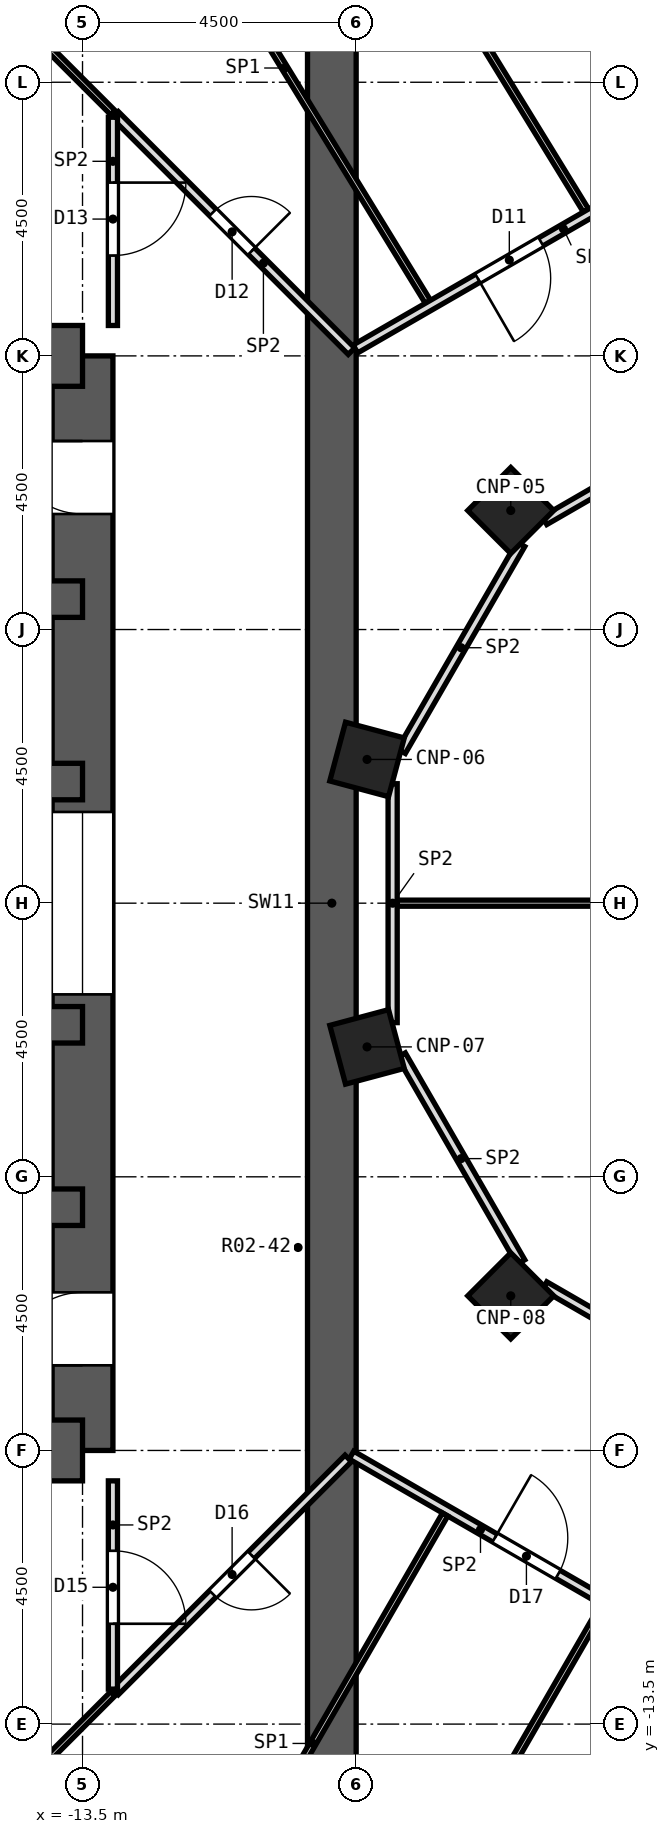
"""IFC4 building model, lengths in metres.
Left out: names, types, materials, properties, quantities, classifications, styles, units other than length and angle.
Written with IfcOpenShell. Run it as: python <this file> out.ifc"""

import sys

from ifc_helpers import new_model, si_unit, direction, frame, frame_2d, origin, origin_2d, place, context, subcontext, project, spatial, rectangle, extrude, element, fill, save


model = new_model("IFC4")
c1 = context("Model", 3, precision=1e-05, world=origin(), true_north=direction((0.0, 1.0)))
c2 = subcontext(c1, "Body", "Model", "MODEL_VIEW")
j1 = project(units=[si_unit("LENGTHUNIT", "METRE"), si_unit("PLANEANGLEUNIT", "RADIAN")], contexts=[c1])
p1 = place(None, origin())
s1 = spatial("IfcSite", under=j1, at=p1, CompositionType="ELEMENT")
p2 = place(p1, origin())
s2 = spatial("IfcBuilding", under=s1, at=p2, CompositionType="ELEMENT")
p3 = place(p2, frame((0.0, 0.0, -4.5)))
s3 = spatial("IfcBuildingStorey", under=s2, at=p3, CompositionType="ELEMENT", Elevation=-4.5)
for number, where, z_axis, x_axis in (
    (1, (-6.458, 6.458, 0.0), (0.0, 0.0, 1.0), (-0.707, 0.707, 0.0)),
    (2, (-8.821, 2.364, 0.0), (0.0, 0.0, 1.0), (-0.966, 0.259, 0.0)),
    (3, (-8.821, -2.364, 0.0), (0.0, 0.0, 1.0), (-0.966, -0.259, 0.0)),
    (4, (-6.458, -6.458, 0.0), (0.0, 0.0, 1.0), (-0.707, -0.707, 0.0)),
):
    element("IfcColumn", number, at=place(p3, frame(where, z_axis=z_axis, x_axis=x_axis)), inside=s3, PredefinedType="COLUMN", context=c2, shape_type="SweptSolid", body=[
        extrude(rectangle(XDim=1.0, YDim=1.0, at=origin_2d()), origin(), (0.0, 0.0, 1.0), 4.5),
    ])
p4 = place(p3, frame((-13.5, -9.0, 0.0), z_axis=(0.0, 0.0, 1.0), x_axis=(0.0, 1.0, 0.0)))
e5 = element("IfcWall", 5, at=p4, inside=s3, PredefinedType="SHEAR", context=c2, shape_type="SweptSolid", body=[
    extrude(rectangle(XDim=18.0, YDim=1.0, at=frame_2d((9.0, 0.0))), origin(), (0.0, 0.0, 1.0), 4.5),
])
p5 = place(p4, frame((15.4, 0.0, 0.0)))
e6 = element("IfcOpeningElement", 6, at=p5, cuts=e5, PredefinedType="OPENING", context=c2, shape_type="SweptSolid", body=[
    extrude(rectangle(XDim=1.2, YDim=2.1, at=frame_2d((0.6, 1.05))), frame((0.0, 0.512, 0.0), z_axis=(0.0, -1.0, 0.0), x_axis=(1.0, 0.0, 0.0)), (0.0, 0.0, 1.0), 1.024),
])
p6 = place(p4, frame((1.4, 0.0, 0.0)))
e7 = element("IfcOpeningElement", 7, at=p6, cuts=e5, PredefinedType="OPENING", context=c2, shape_type="SweptSolid", body=[
    extrude(rectangle(XDim=1.2, YDim=2.1, at=frame_2d((0.6, 1.05))), frame((0.0, 0.512, 0.0), z_axis=(0.0, -1.0, 0.0), x_axis=(1.0, 0.0, 0.0)), (0.0, 0.0, 1.0), 1.024),
])
p7 = place(p4, frame((7.5, 0.0, 0.0)))
e8 = element("IfcOpeningElement", 8, at=p7, cuts=e5, PredefinedType="OPENING", context=c2, shape_type="SweptSolid", body=[
    extrude(rectangle(XDim=3.0, YDim=2.4, at=frame_2d((1.5, 1.2))), frame((0.0, 0.512, 0.0), z_axis=(0.0, -1.0, 0.0), x_axis=(1.0, 0.0, 0.0)), (0.0, 0.0, 1.0), 1.024),
])
for number, where, z_axis, x_axis in (
    (9, (-13.5, 9.0, 0.0), (0.0, 0.0, 1.0), (-1.0, 0.0, 0.0)),
    (10, (-13.5, -9.0, 0.0), (0.0, 0.0, 1.0), (-1.0, 0.0, 0.0)),
):
    element("IfcWall", number, at=place(p3, frame(where, z_axis=z_axis, x_axis=x_axis)), inside=s3, PredefinedType="SHEAR", context=c2, shape_type="SweptSolid", body=[
        extrude(rectangle(XDim=12.4, YDim=1.0, at=frame_2d((6.2, 0.0))), origin(), (0.0, 0.0, 1.0), 4.5),
    ])
p8 = place(p3, frame((-13.5, 5.0, 0.0), z_axis=(0.0, 0.0, 1.0), x_axis=(-1.0, 0.0, 0.0)))
e11 = element("IfcWall", 11, at=p8, inside=s3, PredefinedType="SHEAR", context=c2, shape_type="SweptSolid", body=[
    extrude(rectangle(XDim=12.4, YDim=0.6, at=frame_2d((6.2, 0.0))), origin(), (0.0, 0.0, 1.0), 4.5),
])
p9 = place(p8, frame((10.31, 0.0, 0.0)))
e12 = element("IfcOpeningElement", 12, at=p9, cuts=e11, PredefinedType="OPENING", context=c2, shape_type="SweptSolid", body=[
    extrude(rectangle(XDim=0.9, YDim=2.1, at=frame_2d((0.45, 1.05))), frame((0.0, 0.312, 0.0), z_axis=(0.0, -1.0, 0.0), x_axis=(1.0, 0.0, 0.0)), (0.0, 0.0, 1.0), 0.624),
])
p10 = place(p3, frame((-13.5, -5.0, 0.0), z_axis=(0.0, 0.0, 1.0), x_axis=(-1.0, 0.0, 0.0)))
e13 = element("IfcWall", 13, at=p10, inside=s3, PredefinedType="SHEAR", context=c2, shape_type="SweptSolid", body=[
    extrude(rectangle(XDim=12.4, YDim=0.6, at=frame_2d((6.2, 0.0))), origin(), (0.0, 0.0, 1.0), 4.5),
])
p11 = place(p10, frame((10.716, 0.0, 0.0)))
e14 = element("IfcOpeningElement", 14, at=p11, cuts=e13, PredefinedType="OPENING", context=c2, shape_type="SweptSolid", body=[
    extrude(rectangle(XDim=0.9, YDim=2.1, at=frame_2d((0.45, 1.05))), frame((0.0, 0.312, 0.0), z_axis=(0.0, -1.0, 0.0), x_axis=(1.0, 0.0, 0.0)), (0.0, 0.0, 1.0), 0.624),
])
p12 = place(p10, frame((0.6, 0.0, 0.0)))
e15 = element("IfcOpeningElement", 15, at=p12, cuts=e13, PredefinedType="OPENING", context=c2, shape_type="SweptSolid", body=[
    extrude(rectangle(XDim=1.1, YDim=2.1, at=frame_2d((0.55, 1.05))), frame((0.0, 0.312, 0.0), z_axis=(0.0, -1.0, 0.0), x_axis=(1.0, 0.0, 0.0)), (0.0, 0.0, 1.0), 0.624),
])
p13 = place(p3, frame((-13.5, 2.0, 0.0), z_axis=(0.0, 0.0, 1.0), x_axis=(-1.0, 0.0, 0.0)))
e16 = element("IfcWall", 16, at=p13, inside=s3, PredefinedType="SHEAR", context=c2, shape_type="SweptSolid", body=[
    extrude(rectangle(XDim=12.4, YDim=0.6, at=frame_2d((6.2, 0.0))), origin(), (0.0, 0.0, 1.0), 4.5),
])
p14 = place(p13, frame((1.076, 0.0, 0.0)))
e17 = element("IfcOpeningElement", 17, at=p14, cuts=e16, PredefinedType="OPENING", context=c2, shape_type="SweptSolid", body=[
    extrude(rectangle(XDim=0.9, YDim=2.1, at=frame_2d((0.45, 1.05))), frame((0.0, 0.312, 0.0), z_axis=(0.0, -1.0, 0.0), x_axis=(1.0, 0.0, 0.0)), (0.0, 0.0, 1.0), 0.624),
])
p15 = place(p13, frame((3.196, 0.0, 0.0)))
e18 = element("IfcOpeningElement", 18, at=p15, cuts=e16, PredefinedType="OPENING", context=c2, shape_type="SweptSolid", body=[
    extrude(rectangle(XDim=0.9, YDim=2.1, at=frame_2d((0.45, 1.05))), frame((0.0, 0.312, 0.0), z_axis=(0.0, -1.0, 0.0), x_axis=(1.0, 0.0, 0.0)), (0.0, 0.0, 1.0), 0.624),
])
p16 = place(p13, frame((5.59, 0.0, 0.0)))
e19 = element("IfcOpeningElement", 19, at=p16, cuts=e16, PredefinedType="OPENING", context=c2, shape_type="SweptSolid", body=[
    extrude(rectangle(XDim=0.9, YDim=2.1, at=frame_2d((0.45, 1.05))), frame((0.0, 0.312, 0.0), z_axis=(0.0, -1.0, 0.0), x_axis=(1.0, 0.0, 0.0)), (0.0, 0.0, 1.0), 0.624),
])
p17 = place(p13, frame((10.31, 0.0, 0.0)))
e20 = element("IfcOpeningElement", 20, at=p17, cuts=e16, PredefinedType="OPENING", context=c2, shape_type="SweptSolid", body=[
    extrude(rectangle(XDim=0.9, YDim=2.1, at=frame_2d((0.45, 1.05))), frame((0.0, 0.312, 0.0), z_axis=(0.0, -1.0, 0.0), x_axis=(1.0, 0.0, 0.0)), (0.0, 0.0, 1.0), 0.624),
])
p18 = place(p3, frame((-13.5, -2.0, 0.0), z_axis=(0.0, 0.0, 1.0), x_axis=(-1.0, 0.0, 0.0)))
e21 = element("IfcWall", 21, at=p18, inside=s3, PredefinedType="SHEAR", context=c2, shape_type="SweptSolid", body=[
    extrude(rectangle(XDim=12.4, YDim=0.6, at=frame_2d((6.2, 0.0))), origin(), (0.0, 0.0, 1.0), 4.5),
])
p19 = place(p18, frame((1.265, 0.0, 0.0)))
e22 = element("IfcOpeningElement", 22, at=p19, cuts=e21, PredefinedType="OPENING", context=c2, shape_type="SweptSolid", body=[
    extrude(rectangle(XDim=1.0, YDim=2.1, at=frame_2d((0.5, 1.05))), frame((0.0, 0.312, 0.0), z_axis=(0.0, -1.0, 0.0), x_axis=(1.0, 0.0, 0.0)), (0.0, 0.0, 1.0), 0.624),
])
p20 = place(p18, frame((10.31, 0.0, 0.0)))
e23 = element("IfcOpeningElement", 23, at=p20, cuts=e21, PredefinedType="OPENING", context=c2, shape_type="SweptSolid", body=[
    extrude(rectangle(XDim=0.9, YDim=2.1, at=frame_2d((0.45, 1.05))), frame((0.0, 0.312, 0.0), z_axis=(0.0, -1.0, 0.0), x_axis=(1.0, 0.0, 0.0)), (0.0, 0.0, 1.0), 0.624),
])
p21 = place(p3, frame((-9.4, -27.077, 0.0), z_axis=(0.0, 0.0, 1.0), x_axis=(0.0, 1.0, 0.0)))
e24 = element("IfcWall", 24, at=p21, inside=s3, PredefinedType="SHEAR", context=c2, shape_type="SweptSolid", body=[
    extrude(rectangle(XDim=54.154, YDim=0.8, at=frame_2d((27.077, 0.0))), origin(), (0.0, 0.0, 1.0), 4.5),
])
p22 = place(p3, frame((-7.128, 26.602, 0.0), z_axis=(0.0, 0.0, 1.0), x_axis=(0.258778692841, -0.965936637742, 0.0)))
e25 = element("IfcWall", 25, at=p22, inside=s3, PredefinedType="PARTITIONING", context=c2, shape_type="SweptSolid", body=[
    extrude(rectangle(XDim=14.702, YDim=0.1, at=frame_2d((7.351, 0.0))), origin(), (0.0, 0.0, 1.0), 3.95),
])
p23 = place(p3, frame((-8.257, -2.499, 0.0), z_axis=(0.0, 0.0, 1.0), x_axis=(0.500061252887, -0.865990036525, 0.0)))
e26 = element("IfcWall", 26, at=p23, inside=s3, PredefinedType="PARTITIONING", context=c2, shape_type="SweptSolid", body=[
    extrude(rectangle(XDim=3.93, YDim=0.15, at=frame_2d((1.965, 0.0))), origin(), (0.0, 0.0, 1.0), 3.95),
])
p24 = place(p3, frame((-12.531, 17.578, 0.0), z_axis=(0.0, 0.0, 1.0), x_axis=(0.522457288025, -0.852665457368, 0.0)))
e27 = element("IfcWall", 27, at=p24, inside=s3, PredefinedType="PARTITIONING", context=c2, shape_type="SweptSolid", body=[
    extrude(rectangle(XDim=9.016, YDim=0.1, at=frame_2d((4.508, 0.0))), origin(), (0.0, 0.0, 1.0), 3.95),
])
p25 = place(p3, frame((-9.949, 19.105, 0.0), z_axis=(0.0, 0.0, 1.0), x_axis=(0.522544340664, -0.852612111127, 0.0)))
e28 = element("IfcWall", 28, at=p25, inside=s3, PredefinedType="PARTITIONING", context=c2, shape_type="SweptSolid", body=[
    extrude(rectangle(XDim=9.048, YDim=0.1, at=frame_2d((4.524, 0.0))), origin(), (0.0, 0.0, 1.0), 3.95),
])
p26 = place(p3, frame((-19.474, 19.474, 0.0), z_axis=(0.0, 0.0, 1.0), x_axis=(0.707106781187, -0.707106781187, 0.0)))
e29 = element("IfcWall", 29, at=p26, inside=s3, PredefinedType="PARTITIONING", context=c2, shape_type="SweptSolid", body=[
    extrude(rectangle(XDim=9.155, YDim=0.1, at=frame_2d((4.578, 0.0))), origin(), (0.0, 0.0, 1.0), 3.95),
])
p27 = place(p3, frame((-12.965, 12.965, 0.0), z_axis=(0.0, 0.0, 1.0), x_axis=(0.707106781187, -0.707106781187, 0.0)))
e30 = element("IfcWall", 30, at=p27, inside=s3, PredefinedType="PARTITIONING", context=c2, shape_type="SweptSolid", body=[
    extrude(rectangle(XDim=5.498, YDim=0.15, at=frame_2d((2.749, 0.0))), origin(), (0.0, 0.0, 1.0), 3.95),
])
p28 = place(p27, frame((2.272, 0.0, 0.0)))
e31 = element("IfcOpeningElement", 31, at=p28, cuts=e30, PredefinedType="OPENING", context=c2, shape_type="SweptSolid", body=[
    extrude(rectangle(XDim=0.9, YDim=2.1, at=frame_2d((0.45, 1.05))), frame((0.0, 0.087, 0.0), z_axis=(0.0, -1.0, 0.0), x_axis=(1.0, 0.0, 0.0)), (0.0, 0.0, 1.0), 0.174),
])
p29 = place(p3, frame((-9.077, -9.077, 0.0), z_axis=(0.0, 0.0, 1.0), x_axis=(0.865961614908, -0.500110469302, 0.0)))
e32 = element("IfcWall", 32, at=p29, inside=s3, PredefinedType="PARTITIONING", context=c2, shape_type="SweptSolid", body=[
    extrude(rectangle(XDim=6.645, YDim=0.15, at=frame_2d((3.322, 0.0))), origin(), (0.0, 0.0, 1.0), 3.95),
])
p30 = place(p29, frame((2.722, 0.0, 0.0)))
e33 = element("IfcOpeningElement", 33, at=p30, cuts=e32, PredefinedType="OPENING", context=c2, shape_type="SweptSolid", body=[
    extrude(rectangle(XDim=1.2, YDim=2.1, at=frame_2d((0.6, 1.05))), frame((0.0, 0.087, 0.0), z_axis=(0.0, -1.0, 0.0), x_axis=(1.0, 0.0, 0.0)), (0.0, 0.0, 1.0), 0.174),
])
p31 = place(p29, frame((5.284, 0.0, 0.0)))
e34 = element("IfcOpeningElement", 34, at=p31, cuts=e32, PredefinedType="OPENING", context=c2, shape_type="SweptSolid", body=[
    extrude(rectangle(XDim=0.9, YDim=2.1, at=frame_2d((0.45, 1.05))), frame((0.0, 0.087, 0.0), z_axis=(0.0, -1.0, 0.0), x_axis=(1.0, 0.0, 0.0)), (0.0, 0.0, 1.0), 0.174),
])
p32 = place(p3, frame((-5.902, -6.292, 0.0), z_axis=(0.0, 0.0, 1.0), x_axis=(0.865990036525, -0.500061252887, 0.0)))
e35 = element("IfcWall", 35, at=p32, inside=s3, PredefinedType="PARTITIONING", context=c2, shape_type="SweptSolid", body=[
    extrude(rectangle(XDim=3.93, YDim=0.15, at=frame_2d((1.965, 0.0))), origin(), (0.0, 0.0, 1.0), 3.95),
])
p33 = place(p3, frame((-8.325, 0.0, 0.0), z_axis=(0.0, 0.0, 1.0), x_axis=(1.0, 0.0, 0.0)))
e36 = element("IfcWall", 36, at=p33, inside=s3, PredefinedType="PARTITIONING", context=c2, shape_type="SweptSolid", body=[
    extrude(rectangle(XDim=16.65, YDim=0.1, at=frame_2d((8.325, 0.0))), origin(), (0.0, 0.0, 1.0), 3.95),
])
p34 = place(p3, frame((-5.902, 6.292, 0.0), z_axis=(0.0, 0.0, 1.0), x_axis=(0.865990036525, 0.500061252887, 0.0)))
e37 = element("IfcWall", 37, at=p34, inside=s3, PredefinedType="PARTITIONING", context=c2, shape_type="SweptSolid", body=[
    extrude(rectangle(XDim=3.93, YDim=0.15, at=frame_2d((1.965, 0.0))), origin(), (0.0, 0.0, 1.0), 3.95),
])
p35 = place(p3, frame((-9.012, 9.115, 0.0), z_axis=(0.0, 0.0, 1.0), x_axis=(0.865967095912, 0.5001009786, 0.0)))
e38 = element("IfcWall", 38, at=p35, inside=s3, PredefinedType="PARTITIONING", context=c2, shape_type="SweptSolid", body=[
    extrude(rectangle(XDim=6.495, YDim=0.15, at=frame_2d((3.248, 0.0))), origin(), (0.0, 0.0, 1.0), 3.95),
])
p36 = place(p35, frame((5.046, 0.0, 0.0)))
e39 = element("IfcOpeningElement", 39, at=p36, cuts=e38, PredefinedType="OPENING", context=c2, shape_type="SweptSolid", body=[
    extrude(rectangle(XDim=0.9, YDim=2.1, at=frame_2d((0.45, 1.05))), frame((0.0, 0.087, 0.0), z_axis=(0.0, -1.0, 0.0), x_axis=(1.0, 0.0, 0.0)), (0.0, 0.0, 1.0), 0.174),
])
p37 = place(p35, frame((2.323, 0.0, 0.0)))
e40 = element("IfcOpeningElement", 40, at=p37, cuts=e38, PredefinedType="OPENING", context=c2, shape_type="SweptSolid", body=[
    extrude(rectangle(XDim=1.2, YDim=2.1, at=frame_2d((0.6, 1.05))), frame((0.0, 0.087, 0.0), z_axis=(0.0, -1.0, 0.0), x_axis=(1.0, 0.0, 0.0)), (0.0, 0.0, 1.0), 0.174),
])
p38 = place(p3, frame((-19.474, -19.474, 0.0), z_axis=(0.0, 0.0, 1.0), x_axis=(0.707106781187, 0.707106781187, 0.0)))
e41 = element("IfcWall", 41, at=p38, inside=s3, PredefinedType="PARTITIONING", context=c2, shape_type="SweptSolid", body=[
    extrude(rectangle(XDim=9.155, YDim=0.1, at=frame_2d((4.578, 0.0))), origin(), (0.0, 0.0, 1.0), 3.95),
])
p39 = place(p3, frame((-12.965, -12.965, 0.0), z_axis=(0.0, 0.0, 1.0), x_axis=(0.707106781187, 0.707106781187, 0.0)))
e42 = element("IfcWall", 42, at=p39, inside=s3, PredefinedType="PARTITIONING", context=c2, shape_type="SweptSolid", body=[
    extrude(rectangle(XDim=5.423, YDim=0.15, at=frame_2d((2.711, 0.0))), origin(), (0.0, 0.0, 1.0), 3.95),
])
p40 = place(p39, frame((2.272, 0.0, 0.0)))
e43 = element("IfcOpeningElement", 43, at=p40, cuts=e42, PredefinedType="OPENING", context=c2, shape_type="SweptSolid", body=[
    extrude(rectangle(XDim=0.9, YDim=2.1, at=frame_2d((0.45, 1.05))), frame((0.0, 0.087, 0.0), z_axis=(0.0, -1.0, 0.0), x_axis=(1.0, 0.0, 0.0)), (0.0, 0.0, 1.0), 0.174),
])
p41 = place(p3, frame((-9.286, -19.084, 0.0), z_axis=(0.0, 0.0, 1.0), x_axis=(0.500007644514, 0.866020990177, 0.0)))
e44 = element("IfcWall", 44, at=p41, inside=s3, PredefinedType="PARTITIONING", context=c2, shape_type="SweptSolid", body=[
    extrude(rectangle(XDim=8.695, YDim=0.1, at=frame_2d((4.347, 0.0))), origin(), (0.0, 0.0, 1.0), 3.95),
])
p42 = place(p3, frame((-11.884, -17.584, 0.0), z_axis=(0.0, 0.0, 1.0), x_axis=(0.499971170311, 0.866042047973, 0.0)))
e45 = element("IfcWall", 45, at=p42, inside=s3, PredefinedType="PARTITIONING", context=c2, shape_type="SweptSolid", body=[
    extrude(rectangle(XDim=8.695, YDim=0.1, at=frame_2d((4.348, 0.0))), origin(), (0.0, 0.0, 1.0), 3.95),
])
p43 = place(p3, frame((-8.257, 2.499, 0.0), z_axis=(0.0, 0.0, 1.0), x_axis=(0.500061252887, 0.865990036525, 0.0)))
e46 = element("IfcWall", 46, at=p43, inside=s3, PredefinedType="PARTITIONING", context=c2, shape_type="SweptSolid", body=[
    extrude(rectangle(XDim=3.93, YDim=0.15, at=frame_2d((1.965, 0.0))), origin(), (0.0, 0.0, 1.0), 3.95),
])
p44 = place(p3, frame((-7.128, -26.602, 0.0), z_axis=(0.0, 0.0, 1.0), x_axis=(0.258838422564, 0.965920633906, 0.0)))
e47 = element("IfcWall", 47, at=p44, inside=s3, PredefinedType="PARTITIONING", context=c2, shape_type="SweptSolid", body=[
    extrude(rectangle(XDim=14.627, YDim=0.1, at=frame_2d((7.314, 0.0))), origin(), (0.0, 0.0, 1.0), 3.95),
])
p45 = place(p3, frame((-8.4, -1.964, 0.0), z_axis=(0.0, 0.0, 1.0), x_axis=(0.0, 1.0, 0.0)))
e48 = element("IfcWall", 48, at=p45, inside=s3, PredefinedType="PARTITIONING", context=c2, shape_type="SweptSolid", body=[
    extrude(rectangle(XDim=3.929, YDim=0.15, at=frame_2d((1.964, 0.0))), origin(), (0.0, 0.0, 1.0), 3.95),
])
p46 = place(p3, frame((-13.0, -12.925, 0.0), z_axis=(0.0, 0.0, 1.0), x_axis=(0.0, 1.0, 0.0)))
e49 = element("IfcWall", 49, at=p46, inside=s3, PredefinedType="PARTITIONING", context=c2, shape_type="SweptSolid", body=[
    extrude(rectangle(XDim=3.425, YDim=0.15, at=frame_2d((1.712, 0.0))), origin(), (0.0, 0.0, 1.0), 3.95),
])
p47 = place(p46, frame((1.075, 0.0, 0.0)))
e50 = element("IfcOpeningElement", 50, at=p47, cuts=e49, PredefinedType="OPENING", context=c2, shape_type="SweptSolid", body=[
    extrude(rectangle(XDim=1.2, YDim=2.1, at=frame_2d((0.6, 1.05))), frame((0.0, 0.087, 0.0), z_axis=(0.0, -1.0, 0.0), x_axis=(1.0, 0.0, 0.0)), (0.0, 0.0, 1.0), 0.174),
])
p48 = place(p3, frame((-13.0, 9.5, 0.0), z_axis=(0.0, 0.0, 1.0), x_axis=(0.0, 1.0, 0.0)))
e51 = element("IfcWall", 51, at=p48, inside=s3, PredefinedType="PARTITIONING", context=c2, shape_type="SweptSolid", body=[
    extrude(rectangle(XDim=3.425, YDim=0.15, at=frame_2d((1.712, 0.0))), origin(), (0.0, 0.0, 1.0), 3.95),
])
p49 = place(p48, frame((1.15, 0.0, 0.0)))
e52 = element("IfcOpeningElement", 52, at=p49, cuts=e51, PredefinedType="OPENING", context=c2, shape_type="SweptSolid", body=[
    extrude(rectangle(XDim=1.2, YDim=2.1, at=frame_2d((0.6, 1.05))), frame((0.0, 0.087, 0.0), z_axis=(0.0, -1.0, 0.0), x_axis=(1.0, 0.0, 0.0)), (0.0, 0.0, 1.0), 0.174),
])
p50 = place(p37, frame((1.2, 0.0, 0.0), z_axis=(0.0, 0.0, 1.0), x_axis=(-1.0, 0.0, 0.0)))
e53 = element("IfcDoor", 53, at=p50, inside=s3, OperationType="SINGLE_SWING_RIGHT", PredefinedType="DOOR", context=c2, shape_type="SweptSolid", body=[
    extrude(rectangle(XDim=1.2, YDim=2.1, at=frame_2d((0.6, 1.05))), frame((0.0, 0.025, 0.0), z_axis=(0.0, -1.0, 0.0), x_axis=(1.0, 0.0, 0.0)), (0.0, 0.0, 1.0), 0.05),
])
fill(e40, e53)
p51 = place(p28, origin())
e54 = element("IfcDoor", 54, at=p51, inside=s3, OperationType="SINGLE_SWING_RIGHT", PredefinedType="DOOR", context=c2, shape_type="SweptSolid", body=[
    extrude(rectangle(XDim=0.9, YDim=2.1, at=frame_2d((0.45, 1.05))), frame((0.0, 0.025, 0.0), z_axis=(0.0, -1.0, 0.0), x_axis=(1.0, 0.0, 0.0)), (0.0, 0.0, 1.0), 0.05),
])
fill(e31, e54)
p52 = place(p49, frame((1.2, 0.0, 0.0), z_axis=(0.0, 0.0, 1.0), x_axis=(-1.0, 0.0, 0.0)))
e55 = element("IfcDoor", 55, at=p52, inside=s3, OperationType="SINGLE_SWING_LEFT", PredefinedType="DOOR", context=c2, shape_type="SweptSolid", body=[
    extrude(rectangle(XDim=1.2, YDim=2.1, at=frame_2d((0.6, 1.05))), frame((0.0, 0.025, 0.0), z_axis=(0.0, -1.0, 0.0), x_axis=(1.0, 0.0, 0.0)), (0.0, 0.0, 1.0), 0.05),
])
fill(e52, e55)
p53 = place(p47, frame((1.2, 0.0, 0.0), z_axis=(0.0, 0.0, 1.0), x_axis=(-1.0, 0.0, 0.0)))
e56 = element("IfcDoor", 56, at=p53, inside=s3, OperationType="SINGLE_SWING_RIGHT", PredefinedType="DOOR", context=c2, shape_type="SweptSolid", body=[
    extrude(rectangle(XDim=1.2, YDim=2.1, at=frame_2d((0.6, 1.05))), frame((0.0, 0.025, 0.0), z_axis=(0.0, -1.0, 0.0), x_axis=(1.0, 0.0, 0.0)), (0.0, 0.0, 1.0), 0.05),
])
fill(e50, e56)
p54 = place(p40, frame((0.9, 0.0, 0.0), z_axis=(0.0, 0.0, 1.0), x_axis=(-1.0, 0.0, 0.0)))
e57 = element("IfcDoor", 57, at=p54, inside=s3, OperationType="SINGLE_SWING_LEFT", PredefinedType="DOOR", context=c2, shape_type="SweptSolid", body=[
    extrude(rectangle(XDim=0.9, YDim=2.1, at=frame_2d((0.45, 1.05))), frame((0.0, 0.025, 0.0), z_axis=(0.0, -1.0, 0.0), x_axis=(1.0, 0.0, 0.0)), (0.0, 0.0, 1.0), 0.05),
])
fill(e43, e57)
p55 = place(p30, origin())
e58 = element("IfcDoor", 58, at=p55, inside=s3, OperationType="SINGLE_SWING_LEFT", PredefinedType="DOOR", context=c2, shape_type="SweptSolid", body=[
    extrude(rectangle(XDim=1.2, YDim=2.1, at=frame_2d((0.6, 1.05))), frame((0.0, 0.025, 0.0), z_axis=(0.0, -1.0, 0.0), x_axis=(1.0, 0.0, 0.0)), (0.0, 0.0, 1.0), 0.05),
])
fill(e33, e58)
p56 = place(p5, origin())
e59 = element("IfcDoor", 59, at=p56, inside=s3, OperationType="SINGLE_SWING_RIGHT", PredefinedType="DOOR", context=c2, shape_type="SweptSolid", body=[
    extrude(rectangle(XDim=1.2, YDim=2.1, at=frame_2d((0.6, 1.05))), frame((0.0, 0.025, 0.0), z_axis=(0.0, -1.0, 0.0), x_axis=(1.0, 0.0, 0.0)), (0.0, 0.0, 1.0), 0.05),
])
fill(e6, e59)
p57 = place(p6, origin())
e60 = element("IfcDoor", 60, at=p57, inside=s3, OperationType="SINGLE_SWING_LEFT", PredefinedType="DOOR", context=c2, shape_type="SweptSolid", body=[
    extrude(rectangle(XDim=1.2, YDim=2.1, at=frame_2d((0.6, 1.05))), frame((0.0, 0.025, 0.0), z_axis=(0.0, -1.0, 0.0), x_axis=(1.0, 0.0, 0.0)), (0.0, 0.0, 1.0), 0.05),
])
fill(e7, e60)
p58 = place(p7, origin())
e61 = element("IfcDoor", 61, at=p58, inside=s3, OperationType="DOUBLE_DOOR_SLIDING", PredefinedType="DOOR", context=c2, shape_type="SweptSolid", body=[
    extrude(rectangle(XDim=3.0, YDim=2.4, at=frame_2d((1.5, 1.2))), frame((0.0, 0.025, 0.0), z_axis=(0.0, -1.0, 0.0), x_axis=(1.0, 0.0, 0.0)), (0.0, 0.0, 1.0), 0.05),
])
fill(e8, e61)
save(model, sys.argv[1])
